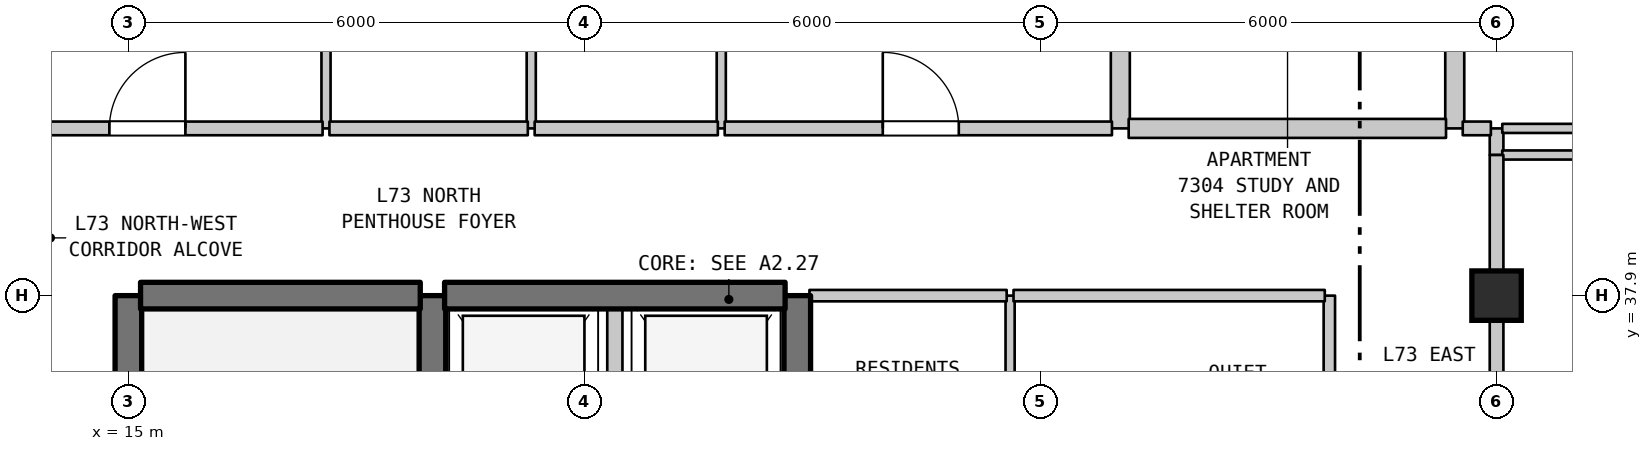
"""IFC4 building model, lengths in metres.
Left out: names, types, materials, properties, quantities, classifications, styles, units other than length and angle.
Written with IfcOpenShell. Run it as: python <this file> out.ifc"""

import sys

from ifc_helpers import new_model, si_unit, direction, frame, frame_2d, origin, origin_2d, place, context, subcontext, project, spatial, rectangle, extrude, element, fill, save


model = new_model("IFC4")
c1 = context("Model", 3, precision=1e-05, world=origin(), true_north=direction((0.0, 1.0)))
c2 = subcontext(c1, "Body", "Model", "MODEL_VIEW")
j1 = project(units=[si_unit("LENGTHUNIT", "METRE"), si_unit("PLANEANGLEUNIT", "RADIAN")], contexts=[c1])
p1 = place(None, origin())
s1 = spatial("IfcSite", under=j1, at=p1, CompositionType="ELEMENT")
p2 = place(p1, origin())
s2 = spatial("IfcBuilding", under=s1, at=p2, CompositionType="ELEMENT")
p3 = place(p2, frame((0.0, 0.0, 291.7)))
s3 = spatial("IfcBuildingStorey", under=s2, at=p3, CompositionType="ELEMENT", Elevation=291.7)
p4 = place(p3, frame((33.0, 37.9, 0.0), z_axis=(0.0, 0.0, 1.0), x_axis=(1.0, 0.0, 0.0)))
e1 = element("IfcColumn", 1, at=p4, inside=s3, PredefinedType="COLUMN", context=c2, shape_type="SweptSolid", body=[
    extrude(rectangle(XDim=0.65, YDim=0.65, at=origin_2d()), origin(), (0.0, 0.0, 1.0), 3.7),
])
p5 = place(p3, frame((15.0, 31.1, 0.0), z_axis=(0.0, 0.0, 1.0), x_axis=(0.0, 1.0, 0.0)))
e2 = element("IfcWall", 2, at=p5, inside=s3, PredefinedType="SHEAR", context=c2, shape_type="SweptSolid", body=[
    extrude(rectangle(XDim=6.8, YDim=0.35, at=frame_2d((3.4, 0.0))), origin(), (0.0, 0.0, 1.0), 3.39),
])
p6 = place(p3, frame((17.6, 40.1, 0.0), z_axis=(0.0, 0.0, 1.0), x_axis=(0.0, 1.0, 0.0)))
e3 = element("IfcWall", 3, at=p6, inside=s3, PredefinedType="PARTITIONING", context=c2, shape_type="SweptSolid", body=[
    extrude(rectangle(XDim=3.2, YDim=0.12, at=frame_2d((1.6, 0.0))), origin(), (0.0, 0.0, 1.0), 3.39),
])
p7 = place(p3, frame((19.0, 35.0, 0.0), z_axis=(0.0, 0.0, 1.0), x_axis=(0.0, 1.0, 0.0)))
e4 = element("IfcWall", 4, at=p7, inside=s3, PredefinedType="SHEAR", context=c2, shape_type="SweptSolid", body=[
    extrude(rectangle(XDim=2.9, YDim=0.35, at=frame_2d((1.45, 0.0))), origin(), (0.0, 0.0, 1.0), 3.39),
])
p8 = place(p3, frame((20.3, 40.1, 0.0), z_axis=(0.0, 0.0, 1.0), x_axis=(0.0, 1.0, 0.0)))
e5 = element("IfcWall", 5, at=p8, inside=s3, PredefinedType="PARTITIONING", context=c2, shape_type="SweptSolid", body=[
    extrude(rectangle(XDim=3.2, YDim=0.12, at=frame_2d((1.6, 0.0))), origin(), (0.0, 0.0, 1.0), 3.39),
])
p9 = place(p8, frame((1.15, 0.0, 0.0)))
e6 = element("IfcOpeningElement", 6, at=p9, cuts=e5, PredefinedType="OPENING", context=c2, shape_type="SweptSolid", body=[
    extrude(rectangle(XDim=0.9, YDim=2.15, at=frame_2d((0.45, 1.075))), frame((0.0, 0.07, 0.0), z_axis=(0.0, -1.0, 0.0), x_axis=(1.0, 0.0, 0.0)), (0.0, 0.0, 1.0), 0.14),
])
p10 = place(p3, frame((21.4, 35.0, 0.0), z_axis=(0.0, 0.0, 1.0), x_axis=(0.0, 1.0, 0.0)))
e7 = element("IfcWall", 7, at=p10, inside=s3, PredefinedType="STANDARD", context=c2, shape_type="SweptSolid", body=[
    extrude(rectangle(XDim=2.9, YDim=0.2, at=frame_2d((1.45, 0.0))), origin(), (0.0, 0.0, 1.0), 3.39),
])
p11 = place(p3, frame((22.8, 40.1, 0.0), z_axis=(0.0, 0.0, 1.0), x_axis=(0.0, 1.0, 0.0)))
e8 = element("IfcWall", 8, at=p11, inside=s3, PredefinedType="PARTITIONING", context=c2, shape_type="SweptSolid", body=[
    extrude(rectangle(XDim=2.05, YDim=0.12, at=frame_2d((1.025, 0.0))), origin(), (0.0, 0.0, 1.0), 3.39),
])
p12 = place(p3, frame((23.8, 35.0, 0.0), z_axis=(0.0, 0.0, 1.0), x_axis=(0.0, 1.0, 0.0)))
e9 = element("IfcWall", 9, at=p12, inside=s3, PredefinedType="SHEAR", context=c2, shape_type="SweptSolid", body=[
    extrude(rectangle(XDim=2.9, YDim=0.35, at=frame_2d((1.45, 0.0))), origin(), (0.0, 0.0, 1.0), 3.39),
])
p13 = place(p3, frame((26.6, 35.0, 0.0), z_axis=(0.0, 0.0, 1.0), x_axis=(0.0, 1.0, 0.0)))
e10 = element("IfcWall", 10, at=p13, inside=s3, PredefinedType="PARTITIONING", context=c2, shape_type="SweptSolid", body=[
    extrude(rectangle(XDim=2.9, YDim=0.12, at=frame_2d((1.45, 0.0))), origin(), (0.0, 0.0, 1.0), 3.39),
])
p14 = place(p3, frame((28.05, 40.1, 0.0), z_axis=(0.0, 0.0, 1.0), x_axis=(0.0, 1.0, 0.0)))
e11 = element("IfcWall", 11, at=p14, inside=s3, PredefinedType="STANDARD", context=c2, shape_type="SweptSolid", body=[
    extrude(rectangle(XDim=2.3, YDim=0.25, at=frame_2d((1.15, 0.0))), origin(), (0.0, 0.0, 1.0), 3.39),
])
p15 = place(p3, frame((30.8, 35.0, 0.0), z_axis=(0.0, 0.0, 1.0), x_axis=(0.0, 1.0, 0.0)))
e12 = element("IfcWall", 12, at=p15, inside=s3, PredefinedType="STANDARD", context=c2, shape_type="SweptSolid", body=[
    extrude(rectangle(XDim=2.9, YDim=0.15, at=frame_2d((1.45, 0.0))), origin(), (0.0, 0.0, 1.0), 3.39),
])
p16 = place(p3, frame((32.45, 40.1, 0.0), z_axis=(0.0, 0.0, 1.0), x_axis=(0.0, 1.0, 0.0)))
e13 = element("IfcWall", 13, at=p16, inside=s3, PredefinedType="STANDARD", context=c2, shape_type="SweptSolid", body=[
    extrude(rectangle(XDim=2.3, YDim=0.25, at=frame_2d((1.15, 0.0))), origin(), (0.0, 0.0, 1.0), 3.39),
])
p17 = place(p3, frame((33.0, 35.755, 0.0), z_axis=(0.0, 0.0, 1.0), x_axis=(0.0, 1.0, 0.0)))
e14 = element("IfcWall", 14, at=p17, inside=s3, PredefinedType="STANDARD", context=c2, shape_type="SweptSolid", body=[
    extrude(rectangle(XDim=2.145, YDim=0.18, at=frame_2d((1.073, 0.0))), origin(), (0.0, 0.0, 1.0), 2.89),
])
p18 = place(p3, frame((33.0, 39.75, 0.0), z_axis=(0.0, 0.0, 1.0), x_axis=(0.0, 1.0, 0.0)))
e15 = element("IfcWall", 15, at=p18, inside=s3, PredefinedType="STANDARD", context=c2, shape_type="SweptSolid", body=[
    extrude(rectangle(XDim=0.35, YDim=0.18, at=frame_2d((0.175, 0.0))), origin(), (0.0, 0.0, 1.0), 3.39),
])
p19 = place(p3, frame((15.16, 37.9, 0.0), z_axis=(0.0, 0.0, 1.0), x_axis=(1.0, 0.0, 0.0)))
e16 = element("IfcWall", 16, at=p19, inside=s3, PredefinedType="SHEAR", context=c2, shape_type="SweptSolid", body=[
    extrude(rectangle(XDim=3.68, YDim=0.35, at=frame_2d((1.84, 0.0))), origin(), (0.0, 0.0, 1.0), 3.39),
])
p20 = place(p3, frame((19.16, 37.9, 0.0), z_axis=(0.0, 0.0, 1.0), x_axis=(1.0, 0.0, 0.0)))
e17 = element("IfcWall", 17, at=p20, inside=s3, PredefinedType="SHEAR", context=c2, shape_type="SweptSolid", body=[
    extrude(rectangle(XDim=4.48, YDim=0.35, at=frame_2d((2.24, 0.0))), origin(), (0.0, 0.0, 1.0), 3.39),
])
p21 = place(p3, frame((23.96, 37.9, 0.0), z_axis=(0.0, 0.0, 1.0), x_axis=(1.0, 0.0, 0.0)))
e18 = element("IfcWall", 18, at=p21, inside=s3, PredefinedType="STANDARD", context=c2, shape_type="SweptSolid", body=[
    extrude(rectangle(XDim=2.595, YDim=0.15, at=frame_2d((1.297, 0.0))), origin(), (0.0, 0.0, 1.0), 2.89),
])
p22 = place(p3, frame((26.645, 37.9, 0.0), z_axis=(0.0, 0.0, 1.0), x_axis=(1.0, 0.0, 0.0)))
e19 = element("IfcWall", 19, at=p22, inside=s3, PredefinedType="STANDARD", context=c2, shape_type="SweptSolid", body=[
    extrude(rectangle(XDim=4.095, YDim=0.15, at=frame_2d((2.047, 0.0))), origin(), (0.0, 0.0, 1.0), 2.89),
])
p23 = place(p3, frame((33.075, 39.75, 0.0), z_axis=(0.0, 0.0, 1.0), x_axis=(1.0, 0.0, 0.0)))
e20 = element("IfcWall", 20, at=p23, inside=s3, PredefinedType="PARTITIONING", context=c2, shape_type="SweptSolid", body=[
    extrude(rectangle(XDim=4.46, YDim=0.12, at=frame_2d((2.23, 0.0))), origin(), (0.0, 0.0, 1.0), 3.39),
])
p24 = place(p3, frame((12.975, 40.1, 0.0), z_axis=(0.0, 0.0, 1.0), x_axis=(1.0, 0.0, 0.0)))
e21 = element("IfcWall", 21, at=p24, inside=s3, PredefinedType="STANDARD", context=c2, shape_type="SweptSolid", body=[
    extrude(rectangle(XDim=4.58, YDim=0.18, at=frame_2d((2.29, 0.0))), origin(), (0.0, 0.0, 1.0), 3.39),
])
p25 = place(p24, frame((1.775, 0.0, 0.0)))
e22 = element("IfcOpeningElement", 22, at=p25, cuts=e21, PredefinedType="OPENING", context=c2, shape_type="SweptSolid", body=[
    extrude(rectangle(XDim=1.0, YDim=2.15, at=frame_2d((0.5, 1.075))), frame((0.0, 0.1, 0.0), z_axis=(0.0, -1.0, 0.0), x_axis=(1.0, 0.0, 0.0)), (0.0, 0.0, 1.0), 0.2),
])
p26 = place(p3, frame((17.645, 40.1, 0.0), z_axis=(0.0, 0.0, 1.0), x_axis=(1.0, 0.0, 0.0)))
e23 = element("IfcWall", 23, at=p26, inside=s3, PredefinedType="STANDARD", context=c2, shape_type="SweptSolid", body=[
    extrude(rectangle(XDim=2.61, YDim=0.18, at=frame_2d((1.305, 0.0))), origin(), (0.0, 0.0, 1.0), 3.39),
])
p27 = place(p3, frame((20.345, 40.1, 0.0), z_axis=(0.0, 0.0, 1.0), x_axis=(1.0, 0.0, 0.0)))
e24 = element("IfcWall", 24, at=p27, inside=s3, PredefinedType="STANDARD", context=c2, shape_type="SweptSolid", body=[
    extrude(rectangle(XDim=2.41, YDim=0.18, at=frame_2d((1.205, 0.0))), origin(), (0.0, 0.0, 1.0), 3.39),
])
p28 = place(p3, frame((22.845, 40.1, 0.0), z_axis=(0.0, 0.0, 1.0), x_axis=(1.0, 0.0, 0.0)))
e25 = element("IfcWall", 25, at=p28, inside=s3, PredefinedType="STANDARD", context=c2, shape_type="SweptSolid", body=[
    extrude(rectangle(XDim=5.095, YDim=0.18, at=frame_2d((2.547, 0.0))), origin(), (0.0, 0.0, 1.0), 3.39),
])
p29 = place(p28, frame((2.08, 0.0, 0.0)))
e26 = element("IfcOpeningElement", 26, at=p29, cuts=e25, PredefinedType="OPENING", context=c2, shape_type="SweptSolid", body=[
    extrude(rectangle(XDim=1.0, YDim=2.15, at=frame_2d((0.5, 1.075))), frame((0.0, 0.1, 0.0), z_axis=(0.0, -1.0, 0.0), x_axis=(1.0, 0.0, 0.0)), (0.0, 0.0, 1.0), 0.2),
])
p30 = place(p3, frame((28.16, 40.1, 0.0), z_axis=(0.0, 0.0, 1.0), x_axis=(1.0, 0.0, 0.0)))
e27 = element("IfcWall", 27, at=p30, inside=s3, PredefinedType="STANDARD", context=c2, shape_type="SweptSolid", body=[
    extrude(rectangle(XDim=4.175, YDim=0.25, at=frame_2d((2.087, 0.0))), origin(), (0.0, 0.0, 1.0), 3.39),
])
p31 = place(p3, frame((32.555, 40.1, 0.0), z_axis=(0.0, 0.0, 1.0), x_axis=(1.0, 0.0, 0.0)))
e28 = element("IfcWall", 28, at=p31, inside=s3, PredefinedType="STANDARD", context=c2, shape_type="SweptSolid", body=[
    extrude(rectangle(XDim=0.37, YDim=0.18, at=frame_2d((0.185, 0.0))), origin(), (0.0, 0.0, 1.0), 3.39),
])
p32 = place(p3, frame((33.075, 40.1, 0.0), z_axis=(0.0, 0.0, 1.0), x_axis=(1.0, 0.0, 0.0)))
e29 = element("IfcWall", 29, at=p32, inside=s3, PredefinedType="PARTITIONING", context=c2, shape_type="SweptSolid", body=[
    extrude(rectangle(XDim=2.881, YDim=0.12, at=frame_2d((1.44, 0.0))), origin(), (0.0, 0.0, 1.0), 3.39),
])
p33 = place(p3, frame((33.0, 37.9, 0.0), z_axis=(0.0, 0.0, 1.0), x_axis=(0.0, 1.0, 0.0)))
e30 = element("IfcWall", 30, at=p33, inside=s3, PredefinedType="STANDARD", context=c2, shape_type="SweptSolid", body=[
    extrude(rectangle(XDim=1.85, YDim=0.18, at=frame_2d((0.925, 0.0))), origin(), (0.0, 0.0, 1.0), 2.79),
])
p34 = place(p25, origin())
e31 = element("IfcDoor", 31, at=p34, inside=s3, OperationType="SINGLE_SWING_RIGHT", PredefinedType="DOOR", context=c2, shape_type="SweptSolid", body=[
    extrude(rectangle(XDim=1.0, YDim=2.15, at=frame_2d((0.5, 1.075))), frame((0.0, 0.025, 0.0), z_axis=(0.0, -1.0, 0.0), x_axis=(1.0, 0.0, 0.0)), (0.0, 0.0, 1.0), 0.05),
])
fill(e22, e31)
p35 = place(p29, origin())
e32 = element("IfcDoor", 32, at=p35, inside=s3, OperationType="SINGLE_SWING_LEFT", PredefinedType="DOOR", context=c2, shape_type="SweptSolid", body=[
    extrude(rectangle(XDim=1.0, YDim=2.15, at=frame_2d((0.5, 1.075))), frame((0.0, 0.025, 0.0), z_axis=(0.0, -1.0, 0.0), x_axis=(1.0, 0.0, 0.0)), (0.0, 0.0, 1.0), 0.05),
])
fill(e26, e32)
save(model, sys.argv[1])
